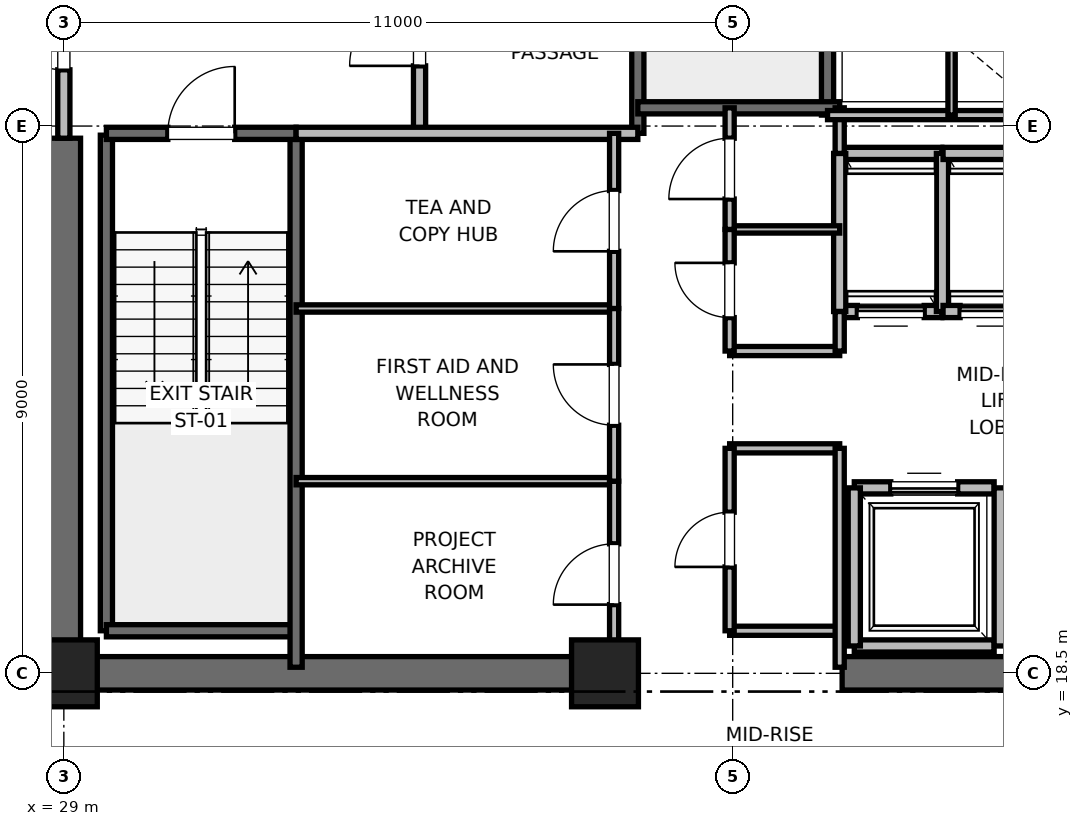
"""IFC4 building model, lengths in metres.
Left out: names, types, materials, properties, quantities, classifications, styles, units other than length and angle.
Written with IfcOpenShell. Run it as: python <this file> out.ifc"""

import sys

from ifc_helpers import new_model, si_unit, direction, frame, frame_2d, origin, origin_2d, place, context, subcontext, project, spatial, rectangle, extrude, element, fill, save


model = new_model("IFC4")
c1 = context("Model", 3, precision=1e-05, world=origin(), true_north=direction((0.0, 1.0)))
c2 = subcontext(c1, "Body", "Model", "MODEL_VIEW")
j1 = project(units=[si_unit("LENGTHUNIT", "METRE"), si_unit("PLANEANGLEUNIT", "RADIAN")], contexts=[c1])
p1 = place(None, origin())
s1 = spatial("IfcSite", under=j1, at=p1, CompositionType="ELEMENT")
p2 = place(p1, origin())
s2 = spatial("IfcBuilding", under=s1, at=p2, CompositionType="ELEMENT")
p3 = place(p2, frame((0.0, 0.0, 160.4)))
s3 = spatial("IfcBuildingStorey", under=s2, at=p3, CompositionType="ELEMENT", Elevation=160.4)
for number, where, z_axis, x_axis in (
    (1, (29.0, 18.5, 0.0), (0.0, 0.0, 1.0), (1.0, 0.0, 0.0)),
    (2, (37.9, 18.5, 0.0), (0.0, 0.0, 1.0), (1.0, 0.0, 0.0)),
):
    element("IfcColumn", number, at=place(p3, frame(where, z_axis=z_axis, x_axis=x_axis)), inside=s3, PredefinedType="PILASTER", context=c2, shape_type="SweptSolid", body=[
        extrude(rectangle(XDim=1.1, YDim=1.1, at=origin_2d()), origin(), (0.0, 0.0, 1.0), 4.0),
    ])
for number, where, z_axis, x_axis in (
    (3, (29.0, 18.5, 0.0), (0.0, 0.0, 1.0), (1.0, 0.0, 0.0)),
    (4, (41.8, 18.5, 0.0), (0.0, 0.0, 1.0), (1.0, 0.0, 0.0)),
):
    element("IfcWall", number, at=place(p3, frame(where, z_axis=z_axis, x_axis=x_axis)), inside=s3, PredefinedType="SHEAR", context=c2, shape_type="SweptSolid", body=[
        extrude(rectangle(XDim=9.2, YDim=0.55, at=frame_2d((4.6, 0.0))), origin(), (0.0, 0.0, 1.0), 3.775),
    ])
p4 = place(p3, frame((29.0, 18.5, 0.0), z_axis=(0.0, 0.0, 1.0), x_axis=(0.0, 1.0, 0.0)))
e5 = element("IfcWall", 5, at=p4, inside=s3, PredefinedType="SHEAR", context=c2, shape_type="SweptSolid", body=[
    extrude(rectangle(XDim=8.8, YDim=0.55, at=frame_2d((4.4, 0.0))), origin(), (0.0, 0.0, 1.0), 3.775),
])
p5 = place(p3, frame((29.7, 19.2, 0.0), z_axis=(0.0, 0.0, 1.0), x_axis=(0.0, 1.0, 0.0)))
e6 = element("IfcWall", 6, at=p5, inside=s3, PredefinedType="SOLIDWALL", context=c2, shape_type="SweptSolid", body=[
    extrude(rectangle(XDim=8.15, YDim=0.2, at=frame_2d((4.075, 0.0))), origin(), (0.0, 0.0, 1.0), 3.775),
])
p6 = place(p3, frame((29.7, 19.2, 0.0), z_axis=(0.0, 0.0, 1.0), x_axis=(1.0, 0.0, 0.0)))
e7 = element("IfcWall", 7, at=p6, inside=s3, PredefinedType="SOLIDWALL", context=c2, shape_type="SweptSolid", body=[
    extrude(rectangle(XDim=3.12, YDim=0.2, at=frame_2d((1.56, 0.0))), origin(), (0.0, 0.0, 1.0), 3.775),
])
p7 = place(p3, frame((32.82, 18.6, 0.0), z_axis=(0.0, 0.0, 1.0), x_axis=(0.0, 1.0, 0.0)))
e8 = element("IfcWall", 8, at=p7, inside=s3, PredefinedType="SOLIDWALL", context=c2, shape_type="SweptSolid", body=[
    extrude(rectangle(XDim=8.78, YDim=0.2, at=frame_2d((4.39, 0.0))), origin(), (0.0, 0.0, 1.0), 3.775),
])
p8 = place(p3, frame((29.7, 27.38, 0.0), z_axis=(0.0, 0.0, 1.0), x_axis=(1.0, 0.0, 0.0)))
e9 = element("IfcWall", 9, at=p8, inside=s3, PredefinedType="SOLIDWALL", context=c2, shape_type="SweptSolid", body=[
    extrude(rectangle(XDim=3.12, YDim=0.2, at=frame_2d((1.56, 0.0))), origin(), (0.0, 0.0, 1.0), 3.775),
])
p9 = place(p8, frame((1.01, 0.0, 0.0)))
e10 = element("IfcOpeningElement", 10, at=p9, cuts=e9, PredefinedType="OPENING", context=c2, shape_type="SweptSolid", body=[
    extrude(rectangle(XDim=1.1, YDim=2.15, at=frame_2d((0.55, 1.075))), frame((0.0, 0.1, 0.0), z_axis=(0.0, -1.0, 0.0), x_axis=(1.0, 0.0, 0.0)), (0.0, 0.0, 1.0), 0.2),
])
p10 = place(p3, frame((38.44, 27.38, 0.0), z_axis=(0.0, 0.0, 1.0), x_axis=(0.0, 1.0, 0.0)))
e11 = element("IfcWall", 11, at=p10, inside=s3, PredefinedType="SOLIDWALL", context=c2, shape_type="SweptSolid", body=[
    extrude(rectangle(XDim=8.87, YDim=0.2, at=frame_2d((4.435, 0.0))), origin(), (0.0, 0.0, 1.0), 3.775),
])
p11 = place(p3, frame((41.56, 27.68, 0.0), z_axis=(0.0, 0.0, 1.0), x_axis=(0.0, 1.0, 0.0)))
e12 = element("IfcWall", 12, at=p11, inside=s3, PredefinedType="SOLIDWALL", context=c2, shape_type="SweptSolid", body=[
    extrude(rectangle(XDim=8.57, YDim=0.2, at=frame_2d((4.285, 0.0))), origin(), (0.0, 0.0, 1.0), 3.775),
])
p12 = place(p3, frame((38.44, 27.8, 0.0), z_axis=(0.0, 0.0, 1.0), x_axis=(1.0, 0.0, 0.0)))
e13 = element("IfcWall", 13, at=p12, inside=s3, PredefinedType="SOLIDWALL", context=c2, shape_type="SweptSolid", body=[
    extrude(rectangle(XDim=3.32, YDim=0.2, at=frame_2d((1.66, 0.0))), origin(), (0.0, 0.0, 1.0), 3.775),
])
p13 = place(p3, frame((34.85, 27.38, 0.0), z_axis=(0.0, 0.0, 1.0), x_axis=(0.0, 1.0, 0.0)))
e14 = element("IfcWall", 14, at=p13, inside=s3, PredefinedType="PARTITIONING", context=c2, shape_type="SweptSolid", body=[
    extrude(rectangle(XDim=3.37, YDim=0.2, at=frame_2d((1.685, 0.0))), origin(), (0.0, 0.0, 1.0), 3.775),
])
p14 = place(p13, frame((1.11, 0.0, 0.0)))
e15 = element("IfcOpeningElement", 15, at=p14, cuts=e14, PredefinedType="OPENING", context=c2, shape_type="SweptSolid", body=[
    extrude(rectangle(XDim=1.15, YDim=2.2, at=frame_2d((0.575, 1.1))), frame((0.0, 0.1, 0.0), z_axis=(0.0, -1.0, 0.0), x_axis=(1.0, 0.0, 0.0)), (0.0, 0.0, 1.0), 0.2),
])
p15 = place(p3, frame((29.0, 27.3, 0.0), z_axis=(0.0, 0.0, 1.0), x_axis=(0.0, 1.0, 0.0)))
e16 = element("IfcWall", 16, at=p15, inside=s3, PredefinedType="PARTITIONING", context=c2, shape_type="SweptSolid", body=[
    extrude(rectangle(XDim=3.4, YDim=0.2, at=frame_2d((1.7, 0.0))), origin(), (0.0, 0.0, 1.0), 2.755),
])
p16 = place(p15, frame((1.125, 0.0, 0.0)))
e17 = element("IfcOpeningElement", 17, at=p16, cuts=e16, PredefinedType="OPENING", context=c2, shape_type="SweptSolid", body=[
    extrude(rectangle(XDim=1.15, YDim=2.2, at=frame_2d((0.575, 1.1))), frame((0.0, 0.1, 0.0), z_axis=(0.0, -1.0, 0.0), x_axis=(1.0, 0.0, 0.0)), (0.0, 0.0, 1.0), 0.2),
])
p17 = place(p3, frame((32.82, 27.38, 0.0), z_axis=(0.0, 0.0, 1.0), x_axis=(1.0, 0.0, 0.0)))
e18 = element("IfcWall", 18, at=p17, inside=s3, PredefinedType="PARTITIONING", context=c2, shape_type="SweptSolid", body=[
    extrude(rectangle(XDim=5.62, YDim=0.2, at=frame_2d((2.81, 0.0))), origin(), (0.0, 0.0, 1.0), 3.775),
])
p18 = place(p3, frame((42.0, 18.95, 0.0), z_axis=(0.0, 0.0, 1.0), x_axis=(1.0, 0.0, 0.0)))
e19 = element("IfcWall", 19, at=p18, inside=s3, PredefinedType="SOLIDWALL", context=c2, shape_type="SweptSolid", body=[
    extrude(rectangle(XDim=2.3, YDim=0.2, at=frame_2d((1.15, 0.0))), origin(), (0.0, 0.0, 1.0), 2.755),
])
p19 = place(p3, frame((44.3, 21.55, 0.0), z_axis=(0.0, 0.0, 1.0), x_axis=(-1.0, 0.0, 0.0)))
e20 = element("IfcWall", 20, at=p19, inside=s3, PredefinedType="SOLIDWALL", context=c2, shape_type="SweptSolid", body=[
    extrude(rectangle(XDim=2.3, YDim=0.2, at=frame_2d((1.15, 0.0))), origin(), (0.0, 0.0, 1.0), 3.775),
])
p20 = place(p19, frame((0.6, 0.0, 0.0)))
e21 = element("IfcOpeningElement", 21, at=p20, cuts=e20, PredefinedType="OPENING", context=c2, shape_type="SweptSolid", body=[
    extrude(rectangle(XDim=1.1, YDim=2.2, at=frame_2d((0.55, 1.1))), frame((0.0, 0.1, 0.0), z_axis=(0.0, -1.0, 0.0), x_axis=(1.0, 0.0, 0.0)), (0.0, 0.0, 1.0), 0.2),
])
p21 = place(p3, frame((42.0, 21.55, 0.0), z_axis=(0.0, 0.0, 1.0), x_axis=(0.0, -1.0, 0.0)))
e22 = element("IfcWall", 22, at=p21, inside=s3, PredefinedType="SOLIDWALL", context=c2, shape_type="SweptSolid", body=[
    extrude(rectangle(XDim=2.6, YDim=0.2, at=frame_2d((1.3, 0.0))), origin(), (0.0, 0.0, 1.0), 2.755),
])
p22 = place(p3, frame((44.4, 18.95, 0.0), z_axis=(0.0, 0.0, 1.0), x_axis=(0.0, 1.0, 0.0)))
e23 = element("IfcWall", 23, at=p22, inside=s3, PredefinedType="SOLIDWALL", context=c2, shape_type="SweptSolid", body=[
    extrude(rectangle(XDim=2.6, YDim=0.2, at=frame_2d((1.3, 0.0))), origin(), (0.0, 0.0, 1.0), 3.775),
])
p23 = place(p3, frame((41.76, 24.45, 0.0), z_axis=(0.0, 0.0, 1.0), x_axis=(1.0, 0.0, 0.0)))
e24 = element("IfcWall", 24, at=p23, inside=s3, PredefinedType="SOLIDWALL", context=c2, shape_type="SweptSolid", body=[
    extrude(rectangle(XDim=1.68, YDim=0.2, at=frame_2d((0.84, 0.0))), origin(), (0.0, 0.0, 1.0), 3.775),
])
p24 = place(p23, frame((0.29, 0.0, 0.0)))
e25 = element("IfcOpeningElement", 25, at=p24, cuts=e24, PredefinedType="OPENING", context=c2, shape_type="SweptSolid", body=[
    extrude(rectangle(XDim=1.1, YDim=2.2, at=frame_2d((0.55, 1.1))), frame((0.0, 0.1, 0.0), z_axis=(0.0, -1.0, 0.0), x_axis=(1.0, 0.0, 0.0)), (0.0, 0.0, 1.0), 0.2),
])
p25 = place(p3, frame((43.44, 27.05, 0.0), z_axis=(0.0, 0.0, 1.0), x_axis=(-1.0, 0.0, 0.0)))
e26 = element("IfcWall", 26, at=p25, inside=s3, PredefinedType="SOLIDWALL", context=c2, shape_type="SweptSolid", body=[
    extrude(rectangle(XDim=1.68, YDim=0.2, at=frame_2d((0.84, 0.0))), origin(), (0.0, 0.0, 1.0), 3.775),
])
for number, where, z_axis, x_axis in (
    (27, (41.76, 27.05, 0.0), (0.0, 0.0, 1.0), (0.0, -1.0, 0.0)),
    (28, (43.45, 24.45, 0.0), (0.0, 0.0, 1.0), (0.0, 1.0, 0.0)),
):
    element("IfcWall", number, at=place(p3, frame(where, z_axis=z_axis, x_axis=x_axis)), inside=s3, PredefinedType="SOLIDWALL", context=c2, shape_type="SweptSolid", body=[
        extrude(rectangle(XDim=2.6, YDim=0.2, at=frame_2d((1.3, 0.0))), origin(), (0.0, 0.0, 1.0), 3.775),
    ])
p26 = place(p3, frame((43.46, 24.45, 0.0), z_axis=(0.0, 0.0, 1.0), x_axis=(1.0, 0.0, 0.0)))
e29 = element("IfcWall", 29, at=p26, inside=s3, PredefinedType="SOLIDWALL", context=c2, shape_type="SweptSolid", body=[
    extrude(rectangle(XDim=1.66, YDim=0.2, at=frame_2d((0.83, 0.0))), origin(), (0.0, 0.0, 1.0), 3.775),
])
p27 = place(p26, frame((0.28, 0.0, 0.0)))
e30 = element("IfcOpeningElement", 30, at=p27, cuts=e29, PredefinedType="OPENING", context=c2, shape_type="SweptSolid", body=[
    extrude(rectangle(XDim=1.1, YDim=2.2, at=frame_2d((0.55, 1.1))), frame((0.0, 0.1, 0.0), z_axis=(0.0, -1.0, 0.0), x_axis=(1.0, 0.0, 0.0)), (0.0, 0.0, 1.0), 0.2),
])
p28 = place(p3, frame((45.12, 27.05, 0.0), z_axis=(0.0, 0.0, 1.0), x_axis=(-1.0, 0.0, 0.0)))
e31 = element("IfcWall", 31, at=p28, inside=s3, PredefinedType="SOLIDWALL", context=c2, shape_type="SweptSolid", body=[
    extrude(rectangle(XDim=1.66, YDim=0.2, at=frame_2d((0.83, 0.0))), origin(), (0.0, 0.0, 1.0), 3.775),
])
for number, where, z_axis, x_axis in (
    (32, (39.95, 19.2, 0.0), (0.0, 0.0, 1.0), (1.0, 0.0, 0.0)),
    (33, (39.95, 22.2, 0.0), (0.0, 0.0, 1.0), (1.0, 0.0, 0.0)),
    (34, (39.95, 23.8, 0.0), (0.0, 0.0, 1.0), (1.0, 0.0, 0.0)),
):
    element("IfcWall", number, at=place(p3, frame(where, z_axis=z_axis, x_axis=x_axis)), inside=s3, PredefinedType="PARTITIONING", context=c2, shape_type="SweptSolid", body=[
        extrude(rectangle(XDim=1.81, YDim=0.15, at=frame_2d((0.905, 0.0))), origin(), (0.0, 0.0, 1.0), 2.85),
    ])
p29 = place(p3, frame((39.95, 25.8, 0.0), z_axis=(0.0, 0.0, 1.0), x_axis=(1.0, 0.0, 0.0)))
e35 = element("IfcWall", 35, at=p29, inside=s3, PredefinedType="PARTITIONING", context=c2, shape_type="SweptSolid", body=[
    extrude(rectangle(XDim=1.81, YDim=0.12, at=frame_2d((0.905, 0.0))), origin(), (0.0, 0.0, 1.0), 2.85),
])
p30 = place(p3, frame((41.76, 18.6, 0.0), z_axis=(0.0, 0.0, 1.0), x_axis=(0.0, 1.0, 0.0)))
e36 = element("IfcWall", 36, at=p30, inside=s3, PredefinedType="PARTITIONING", context=c2, shape_type="SweptSolid", body=[
    extrude(rectangle(XDim=3.6, YDim=0.15, at=frame_2d((1.8, 0.0))), origin(), (0.0, 0.0, 1.0), 2.755),
])
p31 = place(p3, frame((41.76, 23.8, 0.0), z_axis=(0.0, 0.0, 1.0), x_axis=(0.0, 1.0, 0.0)))
e37 = element("IfcWall", 37, at=p31, inside=s3, PredefinedType="PARTITIONING", context=c2, shape_type="SweptSolid", body=[
    extrude(rectangle(XDim=0.65, YDim=0.15, at=frame_2d((0.325, 0.0))), origin(), (0.0, 0.0, 1.0), 2.85),
])
p32 = place(p3, frame((41.76, 27.05, 0.0), z_axis=(0.0, 0.0, 1.0), x_axis=(0.0, 1.0, 0.0)))
e38 = element("IfcWall", 38, at=p32, inside=s3, PredefinedType="PARTITIONING", context=c2, shape_type="SweptSolid", body=[
    extrude(rectangle(XDim=0.75, YDim=0.15, at=frame_2d((0.375, 0.0))), origin(), (0.0, 0.0, 1.0), 2.85),
])
p33 = place(p3, frame((39.95, 19.2, 0.0), z_axis=(0.0, 0.0, 1.0), x_axis=(0.0, 1.0, 0.0)))
e39 = element("IfcWall", 39, at=p33, inside=s3, PredefinedType="PARTITIONING", context=c2, shape_type="SweptSolid", body=[
    extrude(rectangle(XDim=3.0, YDim=0.15, at=frame_2d((1.5, 0.0))), origin(), (0.0, 0.0, 1.0), 2.85),
])
p34 = place(p33, frame((1.05, 0.0, 0.0)))
e40 = element("IfcOpeningElement", 40, at=p34, cuts=e39, PredefinedType="OPENING", context=c2, shape_type="SweptSolid", body=[
    extrude(rectangle(XDim=0.9, YDim=2.1, at=frame_2d((0.45, 1.05))), frame((0.0, 0.075, 0.0), z_axis=(0.0, -1.0, 0.0), x_axis=(1.0, 0.0, 0.0)), (0.0, 0.0, 1.0), 0.15),
])
p35 = place(p3, frame((39.95, 23.8, 0.0), z_axis=(0.0, 0.0, 1.0), x_axis=(0.0, 1.0, 0.0)))
e41 = element("IfcWall", 41, at=p35, inside=s3, PredefinedType="PARTITIONING", context=c2, shape_type="SweptSolid", body=[
    extrude(rectangle(XDim=2.0, YDim=0.15, at=frame_2d((1.0, 0.0))), origin(), (0.0, 0.0, 1.0), 2.85),
])
p36 = place(p35, frame((0.55, 0.0, 0.0)))
e42 = element("IfcOpeningElement", 42, at=p36, cuts=e41, PredefinedType="OPENING", context=c2, shape_type="SweptSolid", body=[
    extrude(rectangle(XDim=0.9, YDim=2.1, at=frame_2d((0.45, 1.05))), frame((0.0, 0.075, 0.0), z_axis=(0.0, -1.0, 0.0), x_axis=(1.0, 0.0, 0.0)), (0.0, 0.0, 1.0), 0.15),
])
p37 = place(p3, frame((39.95, 25.8, 0.0), z_axis=(0.0, 0.0, 1.0), x_axis=(0.0, 1.0, 0.0)))
e43 = element("IfcWall", 43, at=p37, inside=s3, PredefinedType="PARTITIONING", context=c2, shape_type="SweptSolid", body=[
    extrude(rectangle(XDim=2.0, YDim=0.15, at=frame_2d((1.0, 0.0))), origin(), (0.0, 0.0, 1.0), 2.85),
])
p38 = place(p37, frame((0.5, 0.0, 0.0)))
e44 = element("IfcOpeningElement", 44, at=p38, cuts=e43, PredefinedType="OPENING", context=c2, shape_type="SweptSolid", body=[
    extrude(rectangle(XDim=1.0, YDim=2.15, at=frame_2d((0.5, 1.075))), frame((0.0, 0.075, 0.0), z_axis=(0.0, -1.0, 0.0), x_axis=(1.0, 0.0, 0.0)), (0.0, 0.0, 1.0), 0.15),
])
for number, where, z_axis, x_axis in (
    (45, (32.82, 21.66, 0.0), (0.0, 0.0, 1.0), (1.0, 0.0, 0.0)),
    (46, (32.82, 24.5, 0.0), (0.0, 0.0, 1.0), (1.0, 0.0, 0.0)),
):
    element("IfcWall", number, at=place(p3, frame(where, z_axis=z_axis, x_axis=x_axis)), inside=s3, PredefinedType="PARTITIONING", context=c2, shape_type="SweptSolid", body=[
        extrude(rectangle(XDim=5.23, YDim=0.12, at=frame_2d((2.615, 0.0))), origin(), (0.0, 0.0, 1.0), 2.85),
    ])
p39 = place(p3, frame((38.05, 18.6, 0.0), z_axis=(0.0, 0.0, 1.0), x_axis=(0.0, 1.0, 0.0)))
e47 = element("IfcWall", 47, at=p39, inside=s3, PredefinedType="PARTITIONING", context=c2, shape_type="SweptSolid", body=[
    extrude(rectangle(XDim=3.06, YDim=0.15, at=frame_2d((1.53, 0.0))), origin(), (0.0, 0.0, 1.0), 2.755),
])
p40 = place(p39, frame((1.03, 0.0, 0.0)))
e48 = element("IfcOpeningElement", 48, at=p40, cuts=e47, PredefinedType="OPENING", context=c2, shape_type="SweptSolid", body=[
    extrude(rectangle(XDim=1.0, YDim=2.15, at=frame_2d((0.5, 1.075))), frame((0.0, 0.075, 0.0), z_axis=(0.0, -1.0, 0.0), x_axis=(1.0, 0.0, 0.0)), (0.0, 0.0, 1.0), 0.15),
])
p41 = place(p3, frame((38.05, 21.66, 0.0), z_axis=(0.0, 0.0, 1.0), x_axis=(0.0, 1.0, 0.0)))
e49 = element("IfcWall", 49, at=p41, inside=s3, PredefinedType="PARTITIONING", context=c2, shape_type="SweptSolid", body=[
    extrude(rectangle(XDim=2.84, YDim=0.15, at=frame_2d((1.42, 0.0))), origin(), (0.0, 0.0, 1.0), 2.85),
])
p42 = place(p41, frame((0.92, 0.0, 0.0)))
e50 = element("IfcOpeningElement", 50, at=p42, cuts=e49, PredefinedType="OPENING", context=c2, shape_type="SweptSolid", body=[
    extrude(rectangle(XDim=1.0, YDim=2.15, at=frame_2d((0.5, 1.075))), frame((0.0, 0.075, 0.0), z_axis=(0.0, -1.0, 0.0), x_axis=(1.0, 0.0, 0.0)), (0.0, 0.0, 1.0), 0.15),
])
p43 = place(p3, frame((38.05, 24.5, 0.0), z_axis=(0.0, 0.0, 1.0), x_axis=(0.0, 1.0, 0.0)))
e51 = element("IfcWall", 51, at=p43, inside=s3, PredefinedType="PARTITIONING", context=c2, shape_type="SweptSolid", body=[
    extrude(rectangle(XDim=2.88, YDim=0.15, at=frame_2d((1.44, 0.0))), origin(), (0.0, 0.0, 1.0), 2.85),
])
p44 = place(p43, frame((0.94, 0.0, 0.0)))
e52 = element("IfcOpeningElement", 52, at=p44, cuts=e51, PredefinedType="OPENING", context=c2, shape_type="SweptSolid", body=[
    extrude(rectangle(XDim=1.0, YDim=2.15, at=frame_2d((0.5, 1.075))), frame((0.0, 0.075, 0.0), z_axis=(0.0, -1.0, 0.0), x_axis=(1.0, 0.0, 0.0)), (0.0, 0.0, 1.0), 0.15),
])
p45 = place(p3, frame((41.56, 27.68, 0.0), z_axis=(0.0, 0.0, 1.0), x_axis=(1.0, 0.0, 0.0)))
e53 = element("IfcWall", 53, at=p45, inside=s3, PredefinedType="PARTITIONING", context=c2, shape_type="SweptSolid", body=[
    extrude(rectangle(XDim=3.59, YDim=0.15, at=frame_2d((1.795, 0.0))), origin(), (0.0, 0.0, 1.0), 2.85),
])
p46 = place(p3, frame((43.6, 27.68, 0.0), z_axis=(0.0, 0.0, 1.0), x_axis=(0.0, 1.0, 0.0)))
e54 = element("IfcWall", 54, at=p46, inside=s3, PredefinedType="PARTITIONING", context=c2, shape_type="SweptSolid", body=[
    extrude(rectangle(XDim=3.04, YDim=0.12, at=frame_2d((1.52, 0.0))), origin(), (0.0, 0.0, 1.0), 2.85),
])
p47 = place(p9, origin())
e55 = element("IfcDoor", 55, at=p47, inside=s3, OperationType="SINGLE_SWING_RIGHT", PredefinedType="DOOR", context=c2, shape_type="SweptSolid", body=[
    extrude(rectangle(XDim=1.1, YDim=2.15, at=frame_2d((0.55, 1.075))), frame((0.0, 0.025, 0.0), z_axis=(0.0, -1.0, 0.0), x_axis=(1.0, 0.0, 0.0)), (0.0, 0.0, 1.0), 0.05),
])
fill(e10, e55)
p48 = place(p14, origin())
e56 = element("IfcDoor", 56, at=p48, inside=s3, OperationType="SINGLE_SWING_LEFT", PredefinedType="DOOR", context=c2, shape_type="SweptSolid", body=[
    extrude(rectangle(XDim=1.15, YDim=2.2, at=frame_2d((0.575, 1.1))), frame((0.0, 0.025, 0.0), z_axis=(0.0, -1.0, 0.0), x_axis=(1.0, 0.0, 0.0)), (0.0, 0.0, 1.0), 0.05),
])
fill(e15, e56)
p49 = place(p16, origin())
e57 = element("IfcDoor", 57, at=p49, inside=s3, OperationType="SINGLE_SWING_RIGHT", PredefinedType="DOOR", context=c2, shape_type="SweptSolid", body=[
    extrude(rectangle(XDim=1.15, YDim=2.2, at=frame_2d((0.575, 1.1))), frame((0.0, 0.025, 0.0), z_axis=(0.0, -1.0, 0.0), x_axis=(1.0, 0.0, 0.0)), (0.0, 0.0, 1.0), 0.05),
])
fill(e17, e57)
p50 = place(p20, origin())
e58 = element("IfcDoor", 58, at=p50, inside=s3, OperationType="SLIDING_TO_RIGHT", PredefinedType="DOOR", context=c2, shape_type="SweptSolid", body=[
    extrude(rectangle(XDim=1.1, YDim=2.2, at=frame_2d((0.55, 1.1))), frame((0.0, 0.025, 0.0), z_axis=(0.0, -1.0, 0.0), x_axis=(1.0, 0.0, 0.0)), (0.0, 0.0, 1.0), 0.05),
])
fill(e21, e58)
p51 = place(p24, origin())
e59 = element("IfcDoor", 59, at=p51, inside=s3, OperationType="SLIDING_TO_RIGHT", PredefinedType="DOOR", context=c2, shape_type="SweptSolid", body=[
    extrude(rectangle(XDim=1.1, YDim=2.2, at=frame_2d((0.55, 1.1))), frame((0.0, 0.025, 0.0), z_axis=(0.0, -1.0, 0.0), x_axis=(1.0, 0.0, 0.0)), (0.0, 0.0, 1.0), 0.05),
])
fill(e25, e59)
p52 = place(p27, origin())
e60 = element("IfcDoor", 60, at=p52, inside=s3, OperationType="SLIDING_TO_RIGHT", PredefinedType="DOOR", context=c2, shape_type="SweptSolid", body=[
    extrude(rectangle(XDim=1.1, YDim=2.2, at=frame_2d((0.55, 1.1))), frame((0.0, 0.025, 0.0), z_axis=(0.0, -1.0, 0.0), x_axis=(1.0, 0.0, 0.0)), (0.0, 0.0, 1.0), 0.05),
])
fill(e30, e60)
p53 = place(p34, origin())
e61 = element("IfcDoor", 61, at=p53, inside=s3, OperationType="SINGLE_SWING_LEFT", PredefinedType="DOOR", context=c2, shape_type="SweptSolid", body=[
    extrude(rectangle(XDim=0.9, YDim=2.1, at=frame_2d((0.45, 1.05))), frame((0.0, 0.025, 0.0), z_axis=(0.0, -1.0, 0.0), x_axis=(1.0, 0.0, 0.0)), (0.0, 0.0, 1.0), 0.05),
])
fill(e40, e61)
p54 = place(p36, origin())
e62 = element("IfcDoor", 62, at=p54, inside=s3, OperationType="SINGLE_SWING_RIGHT", PredefinedType="DOOR", context=c2, shape_type="SweptSolid", body=[
    extrude(rectangle(XDim=0.9, YDim=2.1, at=frame_2d((0.45, 1.05))), frame((0.0, 0.025, 0.0), z_axis=(0.0, -1.0, 0.0), x_axis=(1.0, 0.0, 0.0)), (0.0, 0.0, 1.0), 0.05),
])
fill(e42, e62)
p55 = place(p38, origin())
e63 = element("IfcDoor", 63, at=p55, inside=s3, OperationType="SINGLE_SWING_LEFT", PredefinedType="DOOR", context=c2, shape_type="SweptSolid", body=[
    extrude(rectangle(XDim=1.0, YDim=2.15, at=frame_2d((0.5, 1.075))), frame((0.0, 0.025, 0.0), z_axis=(0.0, -1.0, 0.0), x_axis=(1.0, 0.0, 0.0)), (0.0, 0.0, 1.0), 0.05),
])
fill(e44, e63)
p56 = place(p40, origin())
e64 = element("IfcDoor", 64, at=p56, inside=s3, OperationType="SINGLE_SWING_LEFT", PredefinedType="DOOR", context=c2, shape_type="SweptSolid", body=[
    extrude(rectangle(XDim=1.0, YDim=2.15, at=frame_2d((0.5, 1.075))), frame((0.0, 0.025, 0.0), z_axis=(0.0, -1.0, 0.0), x_axis=(1.0, 0.0, 0.0)), (0.0, 0.0, 1.0), 0.05),
])
fill(e48, e64)
p57 = place(p42, origin())
e65 = element("IfcDoor", 65, at=p57, inside=s3, OperationType="SINGLE_SWING_RIGHT", PredefinedType="DOOR", context=c2, shape_type="SweptSolid", body=[
    extrude(rectangle(XDim=1.0, YDim=2.15, at=frame_2d((0.5, 1.075))), frame((0.0, 0.025, 0.0), z_axis=(0.0, -1.0, 0.0), x_axis=(1.0, 0.0, 0.0)), (0.0, 0.0, 1.0), 0.05),
])
fill(e50, e65)
p58 = place(p44, origin())
e66 = element("IfcDoor", 66, at=p58, inside=s3, OperationType="SINGLE_SWING_LEFT", PredefinedType="DOOR", context=c2, shape_type="SweptSolid", body=[
    extrude(rectangle(XDim=1.0, YDim=2.15, at=frame_2d((0.5, 1.075))), frame((0.0, 0.025, 0.0), z_axis=(0.0, -1.0, 0.0), x_axis=(1.0, 0.0, 0.0)), (0.0, 0.0, 1.0), 0.05),
])
fill(e52, e66)
save(model, sys.argv[1])
